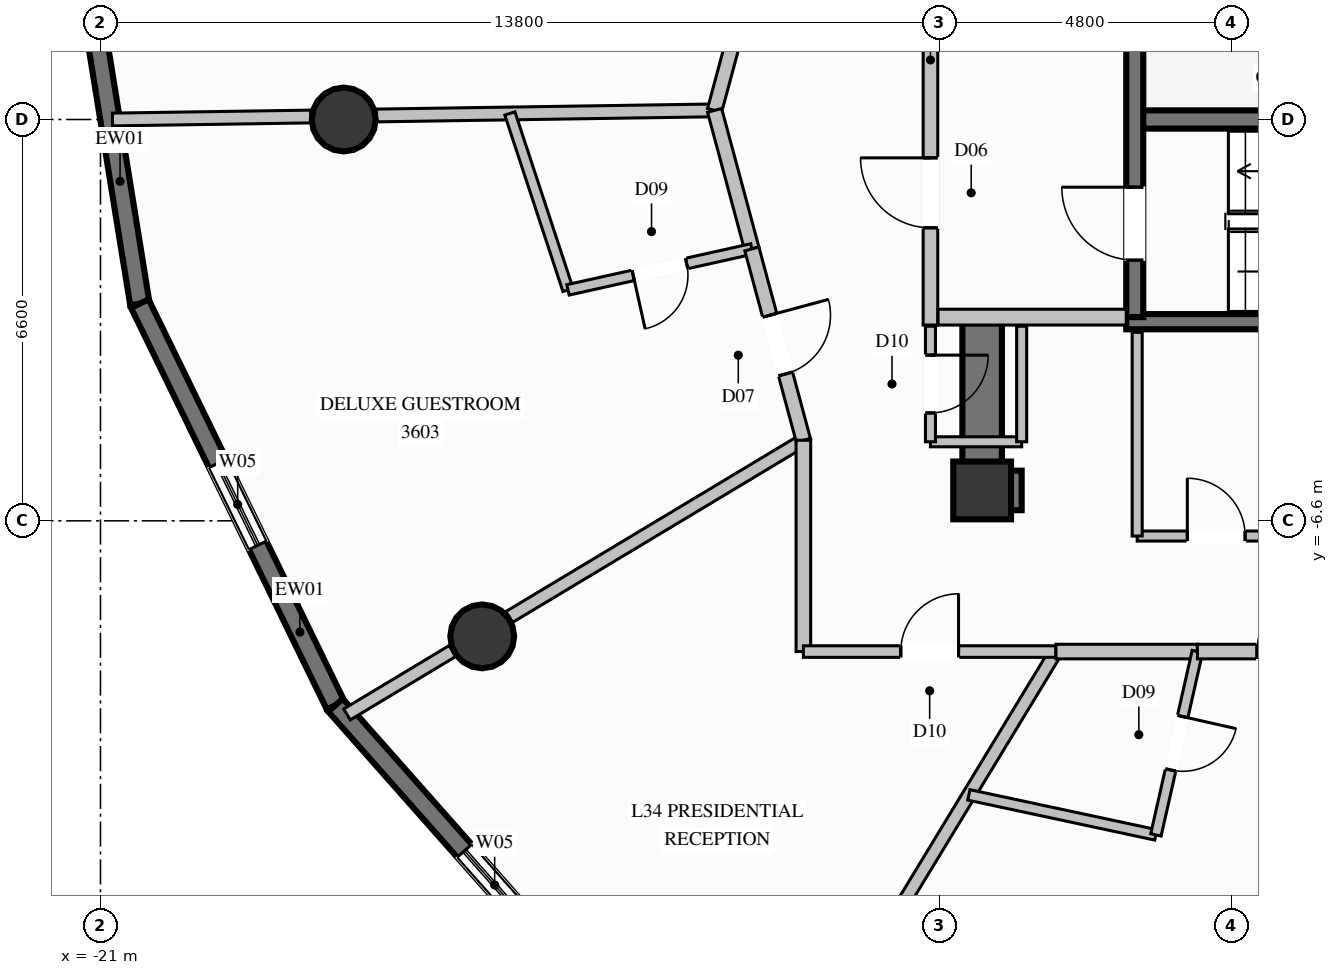
"""IFC4 building model, lengths in metres.
Left out: names, types, materials, properties, quantities, classifications, styles, units other than length and angle.
Written with IfcOpenShell. Run it as: python <this file> out.ifc"""

import sys

from ifc_helpers import new_model, si_unit, direction, frame, frame_2d, origin, origin_2d, place, context, subcontext, project, spatial, rectangle, circle, extrude, element, fill, save


model = new_model("IFC4")
c1 = context("Model", 3, precision=1e-05, world=origin(), true_north=direction((0.0, 1.0)))
c2 = subcontext(c1, "Body", "Model", "MODEL_VIEW")
j1 = project(units=[si_unit("LENGTHUNIT", "METRE"), si_unit("PLANEANGLEUNIT", "RADIAN")], contexts=[c1])
p1 = place(None, origin())
s1 = spatial("IfcSite", under=j1, at=p1, CompositionType="ELEMENT")
p2 = place(p1, origin())
s2 = spatial("IfcBuilding", under=s1, at=p2, CompositionType="ELEMENT")
p3 = place(p2, frame((0.0, 0.0, 135.0)))
s3 = spatial("IfcBuildingStorey", under=s2, at=p3, CompositionType="ELEMENT", Elevation=135.0)
p4 = place(p3, frame((-6.5, -6.1, 0.0), z_axis=(0.0, 0.0, 1.0), x_axis=(1.0, 0.0, 0.0)))
e1 = element("IfcColumn", 1, at=p4, inside=s3, PredefinedType="COLUMN", context=c2, shape_type="SweptSolid", body=[
    extrude(rectangle(XDim=0.95, YDim=0.95, at=origin_2d()), origin(), (0.0, 0.0, 1.0), 3.6),
])
p5 = place(p3, frame((-3.99, 0.0, 0.0), z_axis=(0.0, 0.0, 1.0), x_axis=(1.0, 0.0, 0.0)))
e2 = element("IfcWall", 2, at=p5, inside=s3, PredefinedType="SHEAR", context=c2, shape_type="SweptSolid", body=[
    extrude(rectangle(XDim=7.98, YDim=0.3, at=frame_2d((3.99, 0.0))), origin(), (0.0, 0.0, 1.0), 3.6),
])
p6 = place(p3, frame((-4.13, -3.325, 0.0), z_axis=(0.0, 0.0, 1.0), x_axis=(1.0, 0.0, 0.0)))
e3 = element("IfcWall", 3, at=p6, inside=s3, PredefinedType="SOLIDWALL", context=c2, shape_type="SweptSolid", body=[
    extrude(rectangle(XDim=8.26, YDim=0.25, at=frame_2d((4.13, 0.0))), origin(), (0.0, 0.0, 1.0), 3.6),
])
p7 = place(p3, frame((-6.175, -6.1, 0.0), z_axis=(0.0, 0.0, 1.0), x_axis=(1.0, 0.0, 0.0)))
e4 = element("IfcWall", 4, at=p7, inside=s3, PredefinedType="SHEAR", context=c2, shape_type="SweptSolid", body=[
    extrude(rectangle(XDim=0.325, YDim=0.65, at=frame_2d((0.163, 0.0))), origin(), (0.0, 0.0, 1.0), 3.6),
])
p8 = place(p3, frame((-6.5, -6.425, 0.0), z_axis=(0.0, 0.0, 1.0), x_axis=(0.0, 1.0, 0.0)))
e5 = element("IfcWall", 5, at=p8, inside=s3, PredefinedType="SHEAR", context=c2, shape_type="SweptSolid", body=[
    extrude(rectangle(XDim=3.075, YDim=0.65, at=frame_2d((1.538, 0.0))), origin(), (0.0, 0.0, 1.0), 3.6),
])
for number, where, z_axis, x_axis in (
    (6, (-17.0, 0.0, 0.0), (0.0, 0.0, 1.0), (1.0, 0.0, 0.0)),
    (7, (-14.722, -8.5, 0.0), (0.0, 0.0, 1.0), (1.0, 0.0, 0.0)),
):
    element("IfcColumn", number, at=place(p3, frame(where, z_axis=z_axis, x_axis=x_axis)), inside=s3, PredefinedType="COLUMN", context=c2, shape_type="SweptSolid", body=[
        extrude(circle(Radius=0.525, at=origin_2d()), origin(), (0.0, 0.0, 1.0), 3.6),
    ])
p9 = place(p3, frame((-20.353, -3.028, 0.0), z_axis=(0.0, 0.0, 1.0), x_axis=(-0.159520152435, 0.987194672274, 0.0)))
e8 = element("IfcWall", 8, at=p9, inside=s3, PredefinedType="SOLIDWALL", context=c2, shape_type="SweptSolid", body=[
    extrude(rectangle(XDim=6.99, YDim=0.32, at=frame_2d((3.495, 0.0))), origin(), (0.0, 0.0, 1.0), 3.35),
])
p10 = place(p9, frame((4.325, 0.0, 0.85)))
e9 = element("IfcOpeningElement", 9, at=p10, cuts=e8, PredefinedType="OPENING", context=c2, shape_type="SweptSolid", body=[
    extrude(rectangle(XDim=1.5, YDim=1.2, at=frame_2d((0.75, 0.6))), frame((0.0, 0.17, 0.0), z_axis=(0.0, -1.0, 0.0), x_axis=(1.0, 0.0, 0.0)), (0.0, 0.0, 1.0), 0.34),
])
p11 = place(p3, frame((-17.134, -9.631, 0.0), z_axis=(0.0, 0.0, 1.0), x_axis=(-0.438204261182, 0.898875422671, 0.0)))
e10 = element("IfcWall", 10, at=p11, inside=s3, PredefinedType="SOLIDWALL", context=c2, shape_type="SweptSolid", body=[
    extrude(rectangle(XDim=7.346, YDim=0.32, at=frame_2d((3.673, 0.0))), origin(), (0.0, 0.0, 1.0), 3.35),
])
p12 = place(p11, frame((2.923, 0.0, 0.85)))
e11 = element("IfcOpeningElement", 11, at=p12, cuts=e10, PredefinedType="OPENING", context=c2, shape_type="SweptSolid", body=[
    extrude(rectangle(XDim=1.5, YDim=1.2, at=frame_2d((0.75, 0.6))), frame((0.0, 0.17, 0.0), z_axis=(0.0, -1.0, 0.0), x_axis=(1.0, 0.0, 0.0)), (0.0, 0.0, 1.0), 0.34),
])
p13 = place(p3, frame((-12.125, -15.292, 0.0), z_axis=(0.0, 0.0, 1.0), x_axis=(-0.662672139557, 0.748909631033, 0.0)))
e12 = element("IfcWall", 12, at=p13, inside=s3, PredefinedType="SOLIDWALL", context=c2, shape_type="SweptSolid", body=[
    extrude(rectangle(XDim=7.559, YDim=0.32, at=frame_2d((3.779, 0.0))), origin(), (0.0, 0.0, 1.0), 3.35),
])
p14 = place(p13, frame((2.86, 0.0, 0.85)))
e13 = element("IfcOpeningElement", 13, at=p14, cuts=e12, PredefinedType="OPENING", context=c2, shape_type="SweptSolid", body=[
    extrude(rectangle(XDim=1.5, YDim=1.2, at=frame_2d((0.75, 0.6))), frame((0.0, 0.17, 0.0), z_axis=(0.0, -1.0, 0.0), x_axis=(1.0, 0.0, 0.0)), (0.0, 0.0, 1.0), 0.34),
])
p15 = place(p3, frame((-3.99, -3.25, 0.0), z_axis=(0.0, 0.0, 1.0), x_axis=(0.0, 1.0, 0.0)))
e14 = element("IfcWall", 14, at=p15, inside=s3, PredefinedType="SOLIDWALL", context=c2, shape_type="SweptSolid", body=[
    extrude(rectangle(XDim=5.46, YDim=0.28, at=frame_2d((2.73, 0.0))), origin(), (0.0, 0.0, 1.0), 3.35),
])
p16 = place(p15, frame((0.937, 0.0, 0.0)))
e15 = element("IfcOpeningElement", 15, at=p16, cuts=e14, PredefinedType="OPENING", context=c2, shape_type="SweptSolid", body=[
    extrude(rectangle(XDim=1.2, YDim=2.2, at=frame_2d((0.6, 1.1))), frame((0.0, 0.15, 0.0), z_axis=(0.0, -1.0, 0.0), x_axis=(1.0, 0.0, 0.0)), (0.0, 0.0, 1.0), 0.3),
])
p17 = place(p3, frame((-7.35, -3.38, 0.0), z_axis=(0.0, 0.0, 1.0), x_axis=(0.0, 1.0, 0.0)))
e16 = element("IfcWall", 16, at=p17, inside=s3, PredefinedType="PARTITIONING", context=c2, shape_type="SweptSolid", body=[
    extrude(rectangle(XDim=5.72, YDim=0.24, at=frame_2d((2.86, 0.0))), origin(), (0.0, 0.0, 1.0), 2.435),
])
p18 = place(p17, frame((1.599, 0.0, 0.0)))
e17 = element("IfcOpeningElement", 17, at=p18, cuts=e16, PredefinedType="OPENING", context=c2, shape_type="SweptSolid", body=[
    extrude(rectangle(XDim=1.15, YDim=2.2, at=frame_2d((0.575, 1.1))), frame((0.0, 0.13, 0.0), z_axis=(0.0, -1.0, 0.0), x_axis=(1.0, 0.0, 0.0)), (0.0, 0.0, 1.0), 0.26),
])
p19 = place(p3, frame((-7.225, -3.25, 0.0), z_axis=(0.0, 0.0, 1.0), x_axis=(1.0, 0.0, 0.0)))
e18 = element("IfcWall", 18, at=p19, inside=s3, PredefinedType="PARTITIONING", context=c2, shape_type="SweptSolid", body=[
    extrude(rectangle(XDim=3.095, YDim=0.26, at=frame_2d((1.548, 0.0))), origin(), (0.0, 0.0, 1.0), 3.35),
])
p20 = place(p3, frame((-7.35, -5.3, 0.0), z_axis=(0.0, 0.0, 1.0), x_axis=(1.0, 0.0, 0.0)))
e19 = element("IfcWall", 19, at=p20, inside=s3, PredefinedType="PARTITIONING", context=c2, shape_type="SweptSolid", body=[
    extrude(rectangle(XDim=1.5, YDim=0.165, at=frame_2d((0.75, 0.0))), origin(), (0.0, 0.0, 1.0), 2.435),
])
p21 = place(p3, frame((-5.85, -5.3, 0.0), z_axis=(0.0, 0.0, 1.0), x_axis=(0.0, 1.0, 0.0)))
e20 = element("IfcWall", 20, at=p21, inside=s3, PredefinedType="PARTITIONING", context=c2, shape_type="SweptSolid", body=[
    extrude(rectangle(XDim=1.9, YDim=0.165, at=frame_2d((0.95, 0.0))), origin(), (0.0, 0.0, 1.0), 2.435),
])
p22 = place(p3, frame((-7.35, -3.4, 0.0), z_axis=(0.0, 0.0, 1.0), x_axis=(0.0, -1.0, 0.0)))
e21 = element("IfcWall", 21, at=p22, inside=s3, PredefinedType="PARTITIONING", context=c2, shape_type="SweptSolid", body=[
    extrude(rectangle(XDim=1.9, YDim=0.165, at=frame_2d((0.95, 0.0))), origin(), (0.0, 0.0, 1.0), 3.35),
])
p23 = place(p22, frame((0.475, 0.0, 0.0)))
e22 = element("IfcOpeningElement", 22, at=p23, cuts=e21, PredefinedType="OPENING", context=c2, shape_type="SweptSolid", body=[
    extrude(rectangle(XDim=0.95, YDim=2.1, at=frame_2d((0.475, 1.05))), frame((0.0, 0.093, 0.0), z_axis=(0.0, -1.0, 0.0), x_axis=(1.0, 0.0, 0.0)), (0.0, 0.0, 1.0), 0.185),
])
p24 = place(p3, frame((-3.95, -6.85, 0.0), z_axis=(0.0, 0.0, 1.0), x_axis=(1.0, 0.0, 0.0)))
e23 = element("IfcWall", 23, at=p24, inside=s3, PredefinedType="PARTITIONING", context=c2, shape_type="SweptSolid", body=[
    extrude(rectangle(XDim=2.6, YDim=0.165, at=frame_2d((1.3, 0.0))), origin(), (0.0, 0.0, 1.0), 2.435),
])
p25 = place(p24, frame((0.825, 0.0, 0.0)))
e24 = element("IfcOpeningElement", 24, at=p25, cuts=e23, PredefinedType="OPENING", context=c2, shape_type="SweptSolid", body=[
    extrude(rectangle(XDim=0.95, YDim=2.1, at=frame_2d((0.475, 1.05))), frame((0.0, 0.093, 0.0), z_axis=(0.0, -1.0, 0.0), x_axis=(1.0, 0.0, 0.0)), (0.0, 0.0, 1.0), 0.185),
])
p26 = place(p3, frame((-3.95, -3.5, 0.0), z_axis=(0.0, 0.0, 1.0), x_axis=(0.0, -1.0, 0.0)))
e25 = element("IfcWall", 25, at=p26, inside=s3, PredefinedType="PARTITIONING", context=c2, shape_type="SweptSolid", body=[
    extrude(rectangle(XDim=3.35, YDim=0.165, at=frame_2d((1.675, 0.0))), origin(), (0.0, 0.0, 1.0), 3.35),
])
p27 = place(p3, frame((-10.9, 0.15, 0.0), z_axis=(0.0, 0.0, 1.0), x_axis=(-0.999885899777, -0.015105873936, 0.0)))
e26 = element("IfcWall", 26, at=p27, inside=s3, PredefinedType="PARTITIONING", context=c2, shape_type="SweptSolid", body=[
    extrude(rectangle(XDim=5.56, YDim=0.21, at=frame_2d((2.78, 0.0))), origin(), (0.0, 0.0, 1.0), 2.419),
])
p28 = place(p3, frame((-17.543, 0.049, 0.0), z_axis=(0.0, 0.0, 1.0), x_axis=(-0.999886658015, -0.015055601038, 0.0)))
e27 = element("IfcWall", 27, at=p28, inside=s3, PredefinedType="PARTITIONING", context=c2, shape_type="SweptSolid", body=[
    extrude(rectangle(XDim=3.26, YDim=0.21, at=frame_2d((1.63, 0.0))), origin(), (0.0, 0.0, 1.0), 2.419),
])
p29 = place(p3, frame((-9.44, -5.275, 0.0), z_axis=(0.0, 0.0, 1.0), x_axis=(-0.857218051621, -0.514953601769, 0.0)))
e28 = element("IfcWall", 28, at=p29, inside=s3, PredefinedType="PARTITIONING", context=c2, shape_type="SweptSolid", body=[
    extrude(rectangle(XDim=5.645, YDim=0.21, at=frame_2d((2.823, 0.0))), origin(), (0.0, 0.0, 1.0), 2.717),
])
p30 = place(p3, frame((-15.211, -8.741, 0.0), z_axis=(0.0, 0.0, 1.0), x_axis=(-0.857077653739, -0.515187243108, 0.0)))
e29 = element("IfcWall", 29, at=p30, inside=s3, PredefinedType="PARTITIONING", context=c2, shape_type="SweptSolid", body=[
    extrude(rectangle(XDim=2.024, YDim=0.21, at=frame_2d((1.012, 0.0))), origin(), (0.0, 0.0, 1.0), 3.35),
])
p31 = place(p3, frame((-10.053, 3.297, 0.0), z_axis=(0.0, 0.0, 1.0), x_axis=(-0.25985795735, -0.965646851598, 0.0)))
e30 = element("IfcWall", 30, at=p31, inside=s3, PredefinedType="PARTITIONING", context=c2, shape_type="SweptSolid", body=[
    extrude(rectangle(XDim=3.259, YDim=0.24, at=frame_2d((1.63, 0.0))), origin(), (0.0, 0.0, 1.0), 3.35),
])
p32 = place(p31, frame((1.129, 0.0, 0.0)))
e31 = element("IfcOpeningElement", 31, at=p32, cuts=e30, PredefinedType="OPENING", context=c2, shape_type="SweptSolid", body=[
    extrude(rectangle(XDim=1.0, YDim=2.2, at=frame_2d((0.5, 1.1))), frame((0.0, 0.13, 0.0), z_axis=(0.0, -1.0, 0.0), x_axis=(1.0, 0.0, 0.0)), (0.0, 0.0, 1.0), 0.26),
])
p33 = place(p3, frame((-10.9, 0.15, 0.0), z_axis=(0.0, 0.0, 1.0), x_axis=(0.259684059781, -0.965693631073, 0.0)))
e32 = element("IfcWall", 32, at=p33, inside=s3, PredefinedType="PARTITIONING", context=c2, shape_type="SweptSolid", body=[
    extrude(rectangle(XDim=2.36, YDim=0.24, at=frame_2d((1.18, 0.0))), origin(), (0.0, 0.0, 1.0), 3.35),
])
p34 = place(p3, frame((-14.267, 0.099, 0.0), z_axis=(0.0, 0.0, 1.0), x_axis=(0.31298893544, -0.949756772175, 0.0)))
e33 = element("IfcWall", 33, at=p34, inside=s3, PredefinedType="PLUMBINGWALL", context=c2, shape_type="SweptSolid", body=[
    extrude(rectangle(XDim=3.055, YDim=0.175, at=frame_2d((1.527, 0.0))), origin(), (0.0, 0.0, 1.0), 3.35),
])
p35 = place(p3, frame((-10.287, -2.129, 0.0), z_axis=(0.0, 0.0, 1.0), x_axis=(-0.976110974076, -0.217272562209, 0.0)))
e34 = element("IfcWall", 34, at=p35, inside=s3, PredefinedType="PLUMBINGWALL", context=c2, shape_type="SweptSolid", body=[
    extrude(rectangle(XDim=3.098, YDim=0.175, at=frame_2d((1.549, 0.0))), origin(), (0.0, 0.0, 1.0), 3.35),
])
p36 = place(p35, frame((1.099, 0.0, 0.0)))
e35 = element("IfcOpeningElement", 35, at=p36, cuts=e34, PredefinedType="OPENING", context=c2, shape_type="SweptSolid", body=[
    extrude(rectangle(XDim=0.9, YDim=2.1, at=frame_2d((0.45, 1.05))), frame((0.0, 0.098, 0.0), z_axis=(0.0, -1.0, 0.0), x_axis=(1.0, 0.0, 0.0)), (0.0, 0.0, 1.0), 0.195),
])
p37 = place(p3, frame((-10.287, -2.129, 0.0), z_axis=(0.0, 0.0, 1.0), x_axis=(0.260021844471, -0.965602734253, 0.0)))
e36 = element("IfcWall", 36, at=p37, inside=s3, PredefinedType="PARTITIONING", context=c2, shape_type="SweptSolid", body=[
    extrude(rectangle(XDim=3.258, YDim=0.24, at=frame_2d((1.629, 0.0))), origin(), (0.0, 0.0, 1.0), 3.35),
])
p38 = place(p37, frame((1.129, 0.0, 0.0)))
e37 = element("IfcOpeningElement", 37, at=p38, cuts=e36, PredefinedType="OPENING", context=c2, shape_type="SweptSolid", body=[
    extrude(rectangle(XDim=1.0, YDim=2.2, at=frame_2d((0.5, 1.1))), frame((0.0, 0.13, 0.0), z_axis=(0.0, -1.0, 0.0), x_axis=(1.0, 0.0, 0.0)), (0.0, 0.0, 1.0), 0.26),
])
p39 = place(p3, frame((-5.286, -8.75, 0.0), z_axis=(0.0, 0.0, 1.0), x_axis=(-0.519068318579, -0.854732753934, 0.0)))
e38 = element("IfcWall", 38, at=p39, inside=s3, PredefinedType="PARTITIONING", context=c2, shape_type="SweptSolid", body=[
    extrude(rectangle(XDim=6.358, YDim=0.21, at=frame_2d((3.179, 0.0))), origin(), (0.0, 0.0, 1.0), 2.717),
])
p40 = place(p3, frame((-9.44, -5.275, 0.0), z_axis=(0.0, 0.0, 1.0), x_axis=(0.0, -1.0, 0.0)))
e39 = element("IfcWall", 39, at=p40, inside=s3, PredefinedType="PARTITIONING", context=c2, shape_type="SweptSolid", body=[
    extrude(rectangle(XDim=3.475, YDim=0.24, at=frame_2d((1.738, 0.0))), origin(), (0.0, 0.0, 1.0), 3.35),
])
p41 = place(p3, frame((-9.44, -8.75, 0.0), z_axis=(0.0, 0.0, 1.0), x_axis=(1.0, 0.0, 0.0)))
e40 = element("IfcWall", 40, at=p41, inside=s3, PredefinedType="PARTITIONING", context=c2, shape_type="SweptSolid", body=[
    extrude(rectangle(XDim=4.154, YDim=0.19, at=frame_2d((2.077, 0.0))), origin(), (0.0, 0.0, 1.0), 3.35),
])
p42 = place(p41, frame((1.602, 0.0, 0.0)))
e41 = element("IfcOpeningElement", 41, at=p42, cuts=e40, PredefinedType="OPENING", context=c2, shape_type="SweptSolid", body=[
    extrude(rectangle(XDim=0.95, YDim=2.1, at=frame_2d((0.475, 1.05))), frame((0.0, 0.105, 0.0), z_axis=(0.0, -1.0, 0.0), x_axis=(1.0, 0.0, 0.0)), (0.0, 0.0, 1.0), 0.21),
])
p43 = place(p3, frame((-5.286, -8.75, 0.0), z_axis=(0.0, 0.0, 1.0), x_axis=(1.0, 0.0, 0.0)))
e42 = element("IfcWall", 42, at=p43, inside=s3, PredefinedType="PARTITIONING", context=c2, shape_type="SweptSolid", body=[
    extrude(rectangle(XDim=2.326, YDim=0.24, at=frame_2d((1.163, 0.0))), origin(), (0.0, 0.0, 1.0), 3.35),
])
p44 = place(p3, frame((-6.718, -11.107, 0.0), z_axis=(0.0, 0.0, 1.0), x_axis=(0.977878450695, -0.209173936394, 0.0)))
e43 = element("IfcWall", 43, at=p44, inside=s3, PredefinedType="PLUMBINGWALL", context=c2, shape_type="SweptSolid", body=[
    extrude(rectangle(XDim=3.146, YDim=0.175, at=frame_2d((1.573, 0.0))), origin(), (0.0, 0.0, 1.0), 3.35),
])
p45 = place(p3, frame((-2.96, -8.75, 0.0), z_axis=(0.0, 0.0, 1.0), x_axis=(-0.220675389146, -0.975347308719, 0.0)))
e44 = element("IfcWall", 44, at=p45, inside=s3, PredefinedType="PLUMBINGWALL", context=c2, shape_type="SweptSolid", body=[
    extrude(rectangle(XDim=3.091, YDim=0.175, at=frame_2d((1.545, 0.0))), origin(), (0.0, 0.0, 1.0), 3.35),
])
p46 = place(p45, frame((1.096, 0.0, 0.0)))
e45 = element("IfcOpeningElement", 45, at=p46, cuts=e44, PredefinedType="OPENING", context=c2, shape_type="SweptSolid", body=[
    extrude(rectangle(XDim=0.9, YDim=2.1, at=frame_2d((0.45, 1.05))), frame((0.0, 0.098, 0.0), z_axis=(0.0, -1.0, 0.0), x_axis=(1.0, 0.0, 0.0)), (0.0, 0.0, 1.0), 0.195),
])
p47 = place(p3, frame((-2.96, -8.75, 0.0), z_axis=(0.0, 0.0, 1.0), x_axis=(1.0, 0.0, 0.0)))
e46 = element("IfcWall", 46, at=p47, inside=s3, PredefinedType="PARTITIONING", context=c2, shape_type="SweptSolid", body=[
    extrude(rectangle(XDim=2.96, YDim=0.24, at=frame_2d((1.48, 0.0))), origin(), (0.0, 0.0, 1.0), 3.35),
])
p48 = place(p47, frame((0.98, 0.0, 0.0)))
e47 = element("IfcOpeningElement", 47, at=p48, cuts=e46, PredefinedType="OPENING", context=c2, shape_type="SweptSolid", body=[
    extrude(rectangle(XDim=1.0, YDim=2.2, at=frame_2d((0.5, 1.1))), frame((0.0, 0.13, 0.0), z_axis=(0.0, -1.0, 0.0), x_axis=(1.0, 0.0, 0.0)), (0.0, 0.0, 1.0), 0.26),
])
p49 = place(p12, origin())
e48 = element("IfcWindow", 48, at=p49, inside=s3, PartitioningType="SINGLE_PANEL", PredefinedType="WINDOW", context=c2, shape_type="SweptSolid", body=[
    extrude(rectangle(XDim=1.5, YDim=1.2, at=frame_2d((0.75, 0.6))), frame((0.0, 0.03, 0.0), z_axis=(0.0, -1.0, 0.0), x_axis=(1.0, 0.0, 0.0)), (0.0, 0.0, 1.0), 0.06),
])
fill(e11, e48)
p50 = place(p14, origin())
e49 = element("IfcWindow", 49, at=p50, inside=s3, PartitioningType="SINGLE_PANEL", PredefinedType="WINDOW", context=c2, shape_type="SweptSolid", body=[
    extrude(rectangle(XDim=1.5, YDim=1.2, at=frame_2d((0.75, 0.6))), frame((0.0, 0.03, 0.0), z_axis=(0.0, -1.0, 0.0), x_axis=(1.0, 0.0, 0.0)), (0.0, 0.0, 1.0), 0.06),
])
fill(e13, e49)
p51 = place(p16, origin())
e50 = element("IfcDoor", 50, at=p51, inside=s3, OperationType="SINGLE_SWING_RIGHT", PredefinedType="DOOR", context=c2, shape_type="SweptSolid", body=[
    extrude(rectangle(XDim=1.2, YDim=2.2, at=frame_2d((0.6, 1.1))), frame((0.0, 0.025, 0.0), z_axis=(0.0, -1.0, 0.0), x_axis=(1.0, 0.0, 0.0)), (0.0, 0.0, 1.0), 0.05),
])
fill(e15, e50)
p52 = place(p18, origin())
e51 = element("IfcDoor", 51, at=p52, inside=s3, OperationType="SINGLE_SWING_RIGHT", PredefinedType="DOOR", context=c2, shape_type="SweptSolid", body=[
    extrude(rectangle(XDim=1.15, YDim=2.2, at=frame_2d((0.575, 1.1))), frame((0.0, 0.025, 0.0), z_axis=(0.0, -1.0, 0.0), x_axis=(1.0, 0.0, 0.0)), (0.0, 0.0, 1.0), 0.05),
])
fill(e17, e51)
p53 = place(p23, origin())
e52 = element("IfcDoor", 52, at=p53, inside=s3, OperationType="SINGLE_SWING_LEFT", PredefinedType="DOOR", context=c2, shape_type="SweptSolid", body=[
    extrude(rectangle(XDim=0.95, YDim=2.1, at=frame_2d((0.475, 1.05))), frame((0.0, 0.025, 0.0), z_axis=(0.0, -1.0, 0.0), x_axis=(1.0, 0.0, 0.0)), (0.0, 0.0, 1.0), 0.05),
])
fill(e22, e52)
p54 = place(p25, origin())
e53 = element("IfcDoor", 53, at=p54, inside=s3, OperationType="SINGLE_SWING_LEFT", PredefinedType="DOOR", context=c2, shape_type="SweptSolid", body=[
    extrude(rectangle(XDim=0.95, YDim=2.1, at=frame_2d((0.475, 1.05))), frame((0.0, 0.025, 0.0), z_axis=(0.0, -1.0, 0.0), x_axis=(1.0, 0.0, 0.0)), (0.0, 0.0, 1.0), 0.05),
])
fill(e24, e53)
p55 = place(p36, origin())
e54 = element("IfcDoor", 54, at=p55, inside=s3, OperationType="SINGLE_SWING_RIGHT", PredefinedType="DOOR", context=c2, shape_type="SweptSolid", body=[
    extrude(rectangle(XDim=0.9, YDim=2.1, at=frame_2d((0.45, 1.05))), frame((0.0, 0.025, 0.0), z_axis=(0.0, -1.0, 0.0), x_axis=(1.0, 0.0, 0.0)), (0.0, 0.0, 1.0), 0.05),
])
fill(e35, e54)
p56 = place(p38, origin())
e55 = element("IfcDoor", 55, at=p56, inside=s3, OperationType="SINGLE_SWING_LEFT", PredefinedType="DOOR", context=c2, shape_type="SweptSolid", body=[
    extrude(rectangle(XDim=1.0, YDim=2.2, at=frame_2d((0.5, 1.1))), frame((0.0, 0.025, 0.0), z_axis=(0.0, -1.0, 0.0), x_axis=(1.0, 0.0, 0.0)), (0.0, 0.0, 1.0), 0.05),
])
fill(e37, e55)
p57 = place(p42, origin())
e56 = element("IfcDoor", 56, at=p57, inside=s3, OperationType="SINGLE_SWING_RIGHT", PredefinedType="DOOR", context=c2, shape_type="SweptSolid", body=[
    extrude(rectangle(XDim=0.95, YDim=2.1, at=frame_2d((0.475, 1.05))), frame((0.0, 0.025, 0.0), z_axis=(0.0, -1.0, 0.0), x_axis=(1.0, 0.0, 0.0)), (0.0, 0.0, 1.0), 0.05),
])
fill(e41, e56)
p58 = place(p46, origin())
e57 = element("IfcDoor", 57, at=p58, inside=s3, OperationType="SINGLE_SWING_LEFT", PredefinedType="DOOR", context=c2, shape_type="SweptSolid", body=[
    extrude(rectangle(XDim=0.9, YDim=2.1, at=frame_2d((0.45, 1.05))), frame((0.0, 0.025, 0.0), z_axis=(0.0, -1.0, 0.0), x_axis=(1.0, 0.0, 0.0)), (0.0, 0.0, 1.0), 0.05),
])
fill(e45, e57)
p59 = place(p48, origin())
e58 = element("IfcDoor", 58, at=p59, inside=s3, OperationType="SINGLE_SWING_RIGHT", PredefinedType="DOOR", context=c2, shape_type="SweptSolid", body=[
    extrude(rectangle(XDim=1.0, YDim=2.2, at=frame_2d((0.5, 1.1))), frame((0.0, 0.025, 0.0), z_axis=(0.0, -1.0, 0.0), x_axis=(1.0, 0.0, 0.0)), (0.0, 0.0, 1.0), 0.05),
])
fill(e47, e58)
save(model, sys.argv[1])
